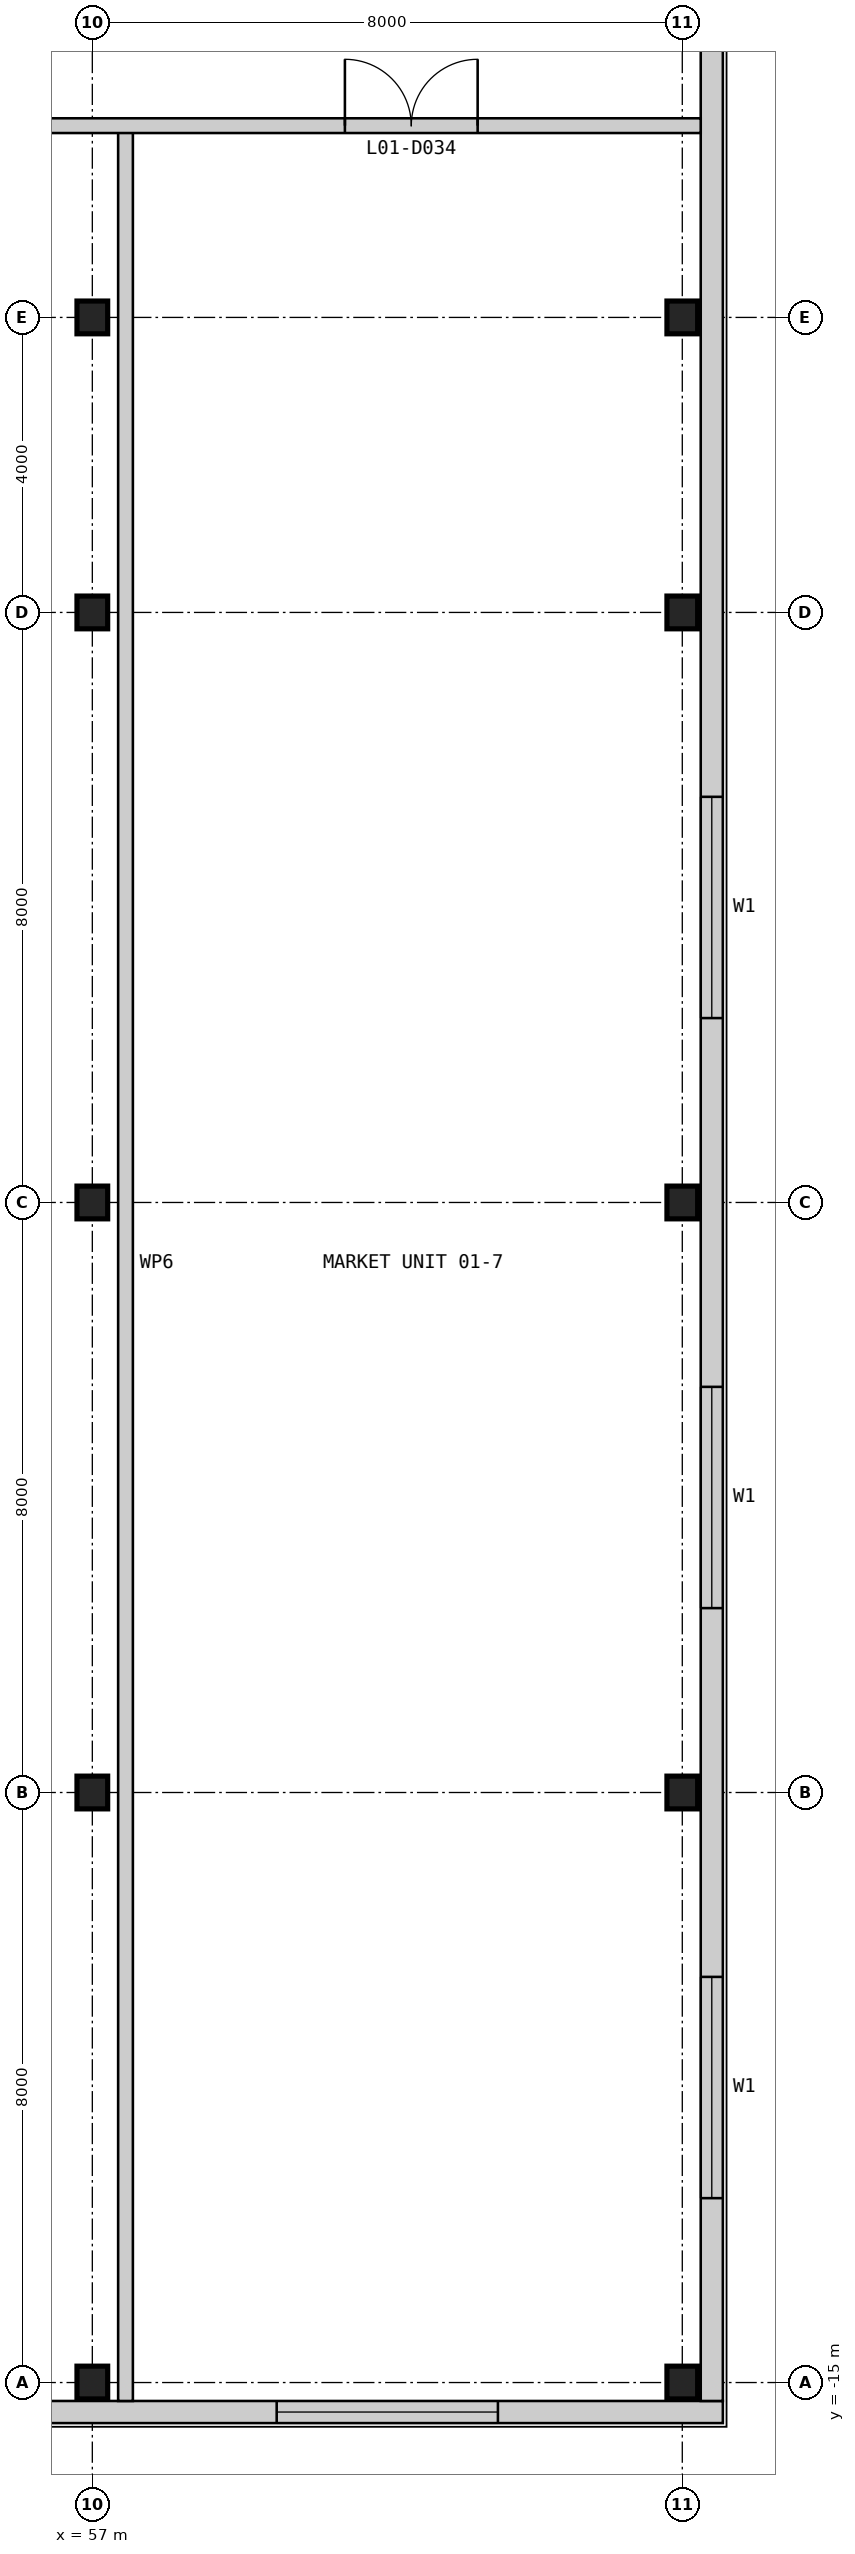
"""IFC4 building model, lengths in metres.
Left out: names, types, materials, properties, quantities, classifications, styles, units other than length and angle.
Written with IfcOpenShell. Run it as: python <this file> out.ifc"""

import sys

from ifc_helpers import new_model, si_unit, direction, frame, frame_2d, origin, origin_2d, place, context, subcontext, project, spatial, rectangle, i_section, extrude, element, fill, save


model = new_model("IFC4")
c1 = context("Model", 3, precision=1e-05, world=origin(), true_north=direction((0.0, 1.0)))
c2 = subcontext(c1, "Body", "Model", "MODEL_VIEW")
j1 = project(units=[si_unit("LENGTHUNIT", "METRE"), si_unit("PLANEANGLEUNIT", "RADIAN")], contexts=[c1])
p1 = place(None, origin())
s1 = spatial("IfcSite", under=j1, at=p1, CompositionType="ELEMENT")
p2 = place(p1, origin())
s2 = spatial("IfcBuilding", under=s1, at=p2, CompositionType="ELEMENT")
p3 = place(p2, frame((0.0, 0.0, 7.0)))
s3 = spatial("IfcBuildingStorey", under=s2, at=p3, CompositionType="ELEMENT", Elevation=7.0)
for number, where, z_axis, x_axis in (
    (1, (57.0, -15.0, 0.0), (0.0, 0.0, 1.0), (1.0, 0.0, 0.0)),
    (2, (57.0, -7.0, 0.0), (0.0, 0.0, 1.0), (1.0, 0.0, 0.0)),
    (3, (57.0, 1.0, 0.0), (0.0, 0.0, 1.0), (1.0, 0.0, 0.0)),
    (4, (57.0, 9.0, 0.0), (0.0, 0.0, 1.0), (1.0, 0.0, 0.0)),
    (5, (57.0, 13.0, 0.0), (0.0, 0.0, 1.0), (1.0, 0.0, 0.0)),
    (6, (65.0, -15.0, 0.0), (0.0, 0.0, 1.0), (1.0, 0.0, 0.0)),
    (7, (65.0, -7.0, 0.0), (0.0, 0.0, 1.0), (1.0, 0.0, 0.0)),
    (8, (65.0, 1.0, 0.0), (0.0, 0.0, 1.0), (1.0, 0.0, 0.0)),
    (9, (65.0, 9.0, 0.0), (0.0, 0.0, 1.0), (1.0, 0.0, 0.0)),
    (10, (65.0, 13.0, 0.0), (0.0, 0.0, 1.0), (1.0, 0.0, 0.0)),
):
    element("IfcColumn", number, at=place(p3, frame(where, z_axis=z_axis, x_axis=x_axis)), inside=s3, PredefinedType="COLUMN", context=c2, shape_type="SweptSolid", body=[
        extrude(i_section(OverallWidth=0.417, OverallDepth=0.445, WebThickness=0.039, FlangeThickness=0.063, at=origin_2d()), origin(), (0.0, 0.0, 1.0), 4.8),
    ])
p4 = place(p3, frame((-15.55, -15.4, 0.0), z_axis=(0.0, 0.0, 1.0), x_axis=(1.0, 0.0, 0.0)))
e11 = element("IfcWall", 11, at=p4, inside=s3, PredefinedType="SOLIDWALL", context=c2, shape_type="SweptSolid", body=[
    extrude(rectangle(XDim=81.1, YDim=0.3, at=frame_2d((40.55, 0.0))), origin(), (0.0, 0.0, 1.0), 4.5),
])
p5 = place(p4, frame((3.05, 0.0, 0.9)))
e12 = element("IfcOpeningElement", 12, at=p5, cuts=e11, PredefinedType="OPENING", context=c2, shape_type="SweptSolid", body=[
    extrude(rectangle(XDim=3.0, YDim=2.4, at=frame_2d((1.5, 1.2))), frame((0.0, 0.16, 0.0), z_axis=(0.0, -1.0, 0.0), x_axis=(1.0, 0.0, 0.0)), (0.0, 0.0, 1.0), 0.32),
])
p6 = place(p4, frame((11.05, 0.0, 0.9)))
e13 = element("IfcOpeningElement", 13, at=p6, cuts=e11, PredefinedType="OPENING", context=c2, shape_type="SweptSolid", body=[
    extrude(rectangle(XDim=3.0, YDim=2.4, at=frame_2d((1.5, 1.2))), frame((0.0, 0.16, 0.0), z_axis=(0.0, -1.0, 0.0), x_axis=(1.0, 0.0, 0.0)), (0.0, 0.0, 1.0), 0.32),
])
p7 = place(p4, frame((19.05, 0.0, 0.9)))
e14 = element("IfcOpeningElement", 14, at=p7, cuts=e11, PredefinedType="OPENING", context=c2, shape_type="SweptSolid", body=[
    extrude(rectangle(XDim=3.0, YDim=2.4, at=frame_2d((1.5, 1.2))), frame((0.0, 0.16, 0.0), z_axis=(0.0, -1.0, 0.0), x_axis=(1.0, 0.0, 0.0)), (0.0, 0.0, 1.0), 0.32),
])
p8 = place(p4, frame((33.05, 0.0, 0.9)))
e15 = element("IfcOpeningElement", 15, at=p8, cuts=e11, PredefinedType="OPENING", context=c2, shape_type="SweptSolid", body=[
    extrude(rectangle(XDim=3.0, YDim=2.4, at=frame_2d((1.5, 1.2))), frame((0.0, 0.16, 0.0), z_axis=(0.0, -1.0, 0.0), x_axis=(1.0, 0.0, 0.0)), (0.0, 0.0, 1.0), 0.32),
])
p9 = place(p4, frame((45.05, 0.0, 0.9)))
e16 = element("IfcOpeningElement", 16, at=p9, cuts=e11, PredefinedType="OPENING", context=c2, shape_type="SweptSolid", body=[
    extrude(rectangle(XDim=3.0, YDim=2.4, at=frame_2d((1.5, 1.2))), frame((0.0, 0.16, 0.0), z_axis=(0.0, -1.0, 0.0), x_axis=(1.0, 0.0, 0.0)), (0.0, 0.0, 1.0), 0.32),
])
p10 = place(p4, frame((53.55, 0.0, 0.9)))
e17 = element("IfcOpeningElement", 17, at=p10, cuts=e11, PredefinedType="OPENING", context=c2, shape_type="SweptSolid", body=[
    extrude(rectangle(XDim=3.0, YDim=2.4, at=frame_2d((1.5, 1.2))), frame((0.0, 0.16, 0.0), z_axis=(0.0, -1.0, 0.0), x_axis=(1.0, 0.0, 0.0)), (0.0, 0.0, 1.0), 0.32),
])
p11 = place(p4, frame((59.55, 0.0, 0.9)))
e18 = element("IfcOpeningElement", 18, at=p11, cuts=e11, PredefinedType="OPENING", context=c2, shape_type="SweptSolid", body=[
    extrude(rectangle(XDim=3.0, YDim=2.4, at=frame_2d((1.5, 1.2))), frame((0.0, 0.16, 0.0), z_axis=(0.0, -1.0, 0.0), x_axis=(1.0, 0.0, 0.0)), (0.0, 0.0, 1.0), 0.32),
])
p12 = place(p4, frame((67.05, 0.0, 0.9)))
e19 = element("IfcOpeningElement", 19, at=p12, cuts=e11, PredefinedType="OPENING", context=c2, shape_type="SweptSolid", body=[
    extrude(rectangle(XDim=3.0, YDim=2.4, at=frame_2d((1.5, 1.2))), frame((0.0, 0.16, 0.0), z_axis=(0.0, -1.0, 0.0), x_axis=(1.0, 0.0, 0.0)), (0.0, 0.0, 1.0), 0.32),
])
p13 = place(p4, frame((75.05, 0.0, 0.9)))
e20 = element("IfcOpeningElement", 20, at=p13, cuts=e11, PredefinedType="OPENING", context=c2, shape_type="SweptSolid", body=[
    extrude(rectangle(XDim=3.0, YDim=2.4, at=frame_2d((1.5, 1.2))), frame((0.0, 0.16, 0.0), z_axis=(0.0, -1.0, 0.0), x_axis=(1.0, 0.0, 0.0)), (0.0, 0.0, 1.0), 0.32),
])
p14 = place(p3, frame((65.4, -15.25, 0.0), z_axis=(0.0, 0.0, 1.0), x_axis=(0.0, 1.0, 0.0)))
e21 = element("IfcWall", 21, at=p14, inside=s3, PredefinedType="SOLIDWALL", context=c2, shape_type="SweptSolid", body=[
    extrude(rectangle(XDim=80.5, YDim=0.3, at=frame_2d((40.25, 0.0))), origin(), (0.0, 0.0, 1.0), 4.5),
])
p15 = place(p14, frame((2.75, 0.0, 0.9)))
e22 = element("IfcOpeningElement", 22, at=p15, cuts=e21, PredefinedType="OPENING", context=c2, shape_type="SweptSolid", body=[
    extrude(rectangle(XDim=3.0, YDim=2.4, at=frame_2d((1.5, 1.2))), frame((0.0, 0.16, 0.0), z_axis=(0.0, -1.0, 0.0), x_axis=(1.0, 0.0, 0.0)), (0.0, 0.0, 1.0), 0.32),
])
p16 = place(p14, frame((10.75, 0.0, 0.9)))
e23 = element("IfcOpeningElement", 23, at=p16, cuts=e21, PredefinedType="OPENING", context=c2, shape_type="SweptSolid", body=[
    extrude(rectangle(XDim=3.0, YDim=2.4, at=frame_2d((1.5, 1.2))), frame((0.0, 0.16, 0.0), z_axis=(0.0, -1.0, 0.0), x_axis=(1.0, 0.0, 0.0)), (0.0, 0.0, 1.0), 0.32),
])
p17 = place(p14, frame((18.75, 0.0, 0.9)))
e24 = element("IfcOpeningElement", 24, at=p17, cuts=e21, PredefinedType="OPENING", context=c2, shape_type="SweptSolid", body=[
    extrude(rectangle(XDim=3.0, YDim=2.4, at=frame_2d((1.5, 1.2))), frame((0.0, 0.16, 0.0), z_axis=(0.0, -1.0, 0.0), x_axis=(1.0, 0.0, 0.0)), (0.0, 0.0, 1.0), 0.32),
])
p18 = place(p14, frame((32.75, 0.0, 0.9)))
e25 = element("IfcOpeningElement", 25, at=p18, cuts=e21, PredefinedType="OPENING", context=c2, shape_type="SweptSolid", body=[
    extrude(rectangle(XDim=3.0, YDim=2.4, at=frame_2d((1.5, 1.2))), frame((0.0, 0.16, 0.0), z_axis=(0.0, -1.0, 0.0), x_axis=(1.0, 0.0, 0.0)), (0.0, 0.0, 1.0), 0.32),
])
p19 = place(p14, frame((44.75, 0.0, 0.9)))
e26 = element("IfcOpeningElement", 26, at=p19, cuts=e21, PredefinedType="OPENING", context=c2, shape_type="SweptSolid", body=[
    extrude(rectangle(XDim=3.0, YDim=2.4, at=frame_2d((1.5, 1.2))), frame((0.0, 0.16, 0.0), z_axis=(0.0, -1.0, 0.0), x_axis=(1.0, 0.0, 0.0)), (0.0, 0.0, 1.0), 0.32),
])
p20 = place(p14, frame((53.25, 0.0, 0.9)))
e27 = element("IfcOpeningElement", 27, at=p20, cuts=e21, PredefinedType="OPENING", context=c2, shape_type="SweptSolid", body=[
    extrude(rectangle(XDim=3.0, YDim=2.4, at=frame_2d((1.5, 1.2))), frame((0.0, 0.16, 0.0), z_axis=(0.0, -1.0, 0.0), x_axis=(1.0, 0.0, 0.0)), (0.0, 0.0, 1.0), 0.32),
])
p21 = place(p14, frame((59.25, 0.0, 0.9)))
e28 = element("IfcOpeningElement", 28, at=p21, cuts=e21, PredefinedType="OPENING", context=c2, shape_type="SweptSolid", body=[
    extrude(rectangle(XDim=3.0, YDim=2.4, at=frame_2d((1.5, 1.2))), frame((0.0, 0.16, 0.0), z_axis=(0.0, -1.0, 0.0), x_axis=(1.0, 0.0, 0.0)), (0.0, 0.0, 1.0), 0.32),
])
p22 = place(p14, frame((66.75, 0.0, 0.9)))
e29 = element("IfcOpeningElement", 29, at=p22, cuts=e21, PredefinedType="OPENING", context=c2, shape_type="SweptSolid", body=[
    extrude(rectangle(XDim=3.0, YDim=2.4, at=frame_2d((1.5, 1.2))), frame((0.0, 0.16, 0.0), z_axis=(0.0, -1.0, 0.0), x_axis=(1.0, 0.0, 0.0)), (0.0, 0.0, 1.0), 0.32),
])
p23 = place(p14, frame((74.75, 0.0, 0.9)))
e30 = element("IfcOpeningElement", 30, at=p23, cuts=e21, PredefinedType="OPENING", context=c2, shape_type="SweptSolid", body=[
    extrude(rectangle(XDim=3.0, YDim=2.4, at=frame_2d((1.5, 1.2))), frame((0.0, 0.16, 0.0), z_axis=(0.0, -1.0, 0.0), x_axis=(1.0, 0.0, 0.0)), (0.0, 0.0, 1.0), 0.32),
])
p24 = place(p3, frame((57.45, -15.25, 0.0), z_axis=(0.0, 0.0, 1.0), x_axis=(0.0, 1.0, 0.0)))
e31 = element("IfcWall", 31, at=p24, inside=s3, PredefinedType="PARTITIONING", context=c2, shape_type="SweptSolid", body=[
    extrude(rectangle(XDim=30.85, YDim=0.2, at=frame_2d((15.425, 0.0))), origin(), (0.0, 0.0, 1.0), 4.5),
])
p25 = place(p3, frame((43.0, 15.6, 0.0), z_axis=(0.0, 0.0, 1.0), x_axis=(1.0, 0.0, 0.0)))
e32 = element("IfcWall", 32, at=p25, inside=s3, PredefinedType="PARTITIONING", context=c2, shape_type="SweptSolid", body=[
    extrude(rectangle(XDim=22.25, YDim=0.2, at=frame_2d((11.125, 0.0))), origin(), (0.0, 0.0, 1.0), 4.5),
])
p26 = place(p25, frame((10.125, 0.0, 0.0)))
e33 = element("IfcOpeningElement", 33, at=p26, cuts=e32, PredefinedType="OPENING", context=c2, shape_type="SweptSolid", body=[
    extrude(rectangle(XDim=1.8, YDim=2.4, at=frame_2d((0.9, 1.2))), frame((0.0, 0.11, 0.0), z_axis=(0.0, -1.0, 0.0), x_axis=(1.0, 0.0, 0.0)), (0.0, 0.0, 1.0), 0.22),
])
p27 = place(p25, frame((17.425, 0.0, 0.0)))
e34 = element("IfcOpeningElement", 34, at=p27, cuts=e32, PredefinedType="OPENING", context=c2, shape_type="SweptSolid", body=[
    extrude(rectangle(XDim=1.8, YDim=2.4, at=frame_2d((0.9, 1.2))), frame((0.0, 0.11, 0.0), z_axis=(0.0, -1.0, 0.0), x_axis=(1.0, 0.0, 0.0)), (0.0, 0.0, 1.0), 0.22),
])
p28 = place(p25, frame((2.925, 0.0, 0.0)))
e35 = element("IfcOpeningElement", 35, at=p28, cuts=e32, PredefinedType="OPENING", context=c2, shape_type="SweptSolid", body=[
    extrude(rectangle(XDim=1.8, YDim=2.4, at=frame_2d((0.9, 1.2))), frame((0.0, 0.11, 0.0), z_axis=(0.0, -1.0, 0.0), x_axis=(1.0, 0.0, 0.0)), (0.0, 0.0, 1.0), 0.22),
])
p29 = place(p13, origin())
e36 = element("IfcWindow", 36, at=p29, inside=s3, PartitioningType="SINGLE_PANEL", PredefinedType="WINDOW", context=c2, shape_type="SweptSolid", body=[
    extrude(rectangle(XDim=3.0, YDim=2.4, at=frame_2d((1.5, 1.2))), frame((0.0, 0.03, 0.0), z_axis=(0.0, -1.0, 0.0), x_axis=(1.0, 0.0, 0.0)), (0.0, 0.0, 1.0), 0.06),
])
fill(e20, e36)
p30 = place(p15, origin())
e37 = element("IfcWindow", 37, at=p30, inside=s3, PartitioningType="SINGLE_PANEL", PredefinedType="WINDOW", context=c2, shape_type="SweptSolid", body=[
    extrude(rectangle(XDim=3.0, YDim=2.4, at=frame_2d((1.5, 1.2))), frame((0.0, 0.03, 0.0), z_axis=(0.0, -1.0, 0.0), x_axis=(1.0, 0.0, 0.0)), (0.0, 0.0, 1.0), 0.06),
])
fill(e22, e37)
p31 = place(p16, origin())
e38 = element("IfcWindow", 38, at=p31, inside=s3, PartitioningType="SINGLE_PANEL", PredefinedType="WINDOW", context=c2, shape_type="SweptSolid", body=[
    extrude(rectangle(XDim=3.0, YDim=2.4, at=frame_2d((1.5, 1.2))), frame((0.0, 0.03, 0.0), z_axis=(0.0, -1.0, 0.0), x_axis=(1.0, 0.0, 0.0)), (0.0, 0.0, 1.0), 0.06),
])
fill(e23, e38)
p32 = place(p17, origin())
e39 = element("IfcWindow", 39, at=p32, inside=s3, PartitioningType="SINGLE_PANEL", PredefinedType="WINDOW", context=c2, shape_type="SweptSolid", body=[
    extrude(rectangle(XDim=3.0, YDim=2.4, at=frame_2d((1.5, 1.2))), frame((0.0, 0.03, 0.0), z_axis=(0.0, -1.0, 0.0), x_axis=(1.0, 0.0, 0.0)), (0.0, 0.0, 1.0), 0.06),
])
fill(e24, e39)
p33 = place(p27, origin())
e40 = element("IfcDoor", 40, at=p33, inside=s3, OperationType="DOUBLE_DOOR_SINGLE_SWING", PredefinedType="DOOR", context=c2, shape_type="SweptSolid", body=[
    extrude(rectangle(XDim=1.8, YDim=2.4, at=frame_2d((0.9, 1.2))), frame((0.0, 0.025, 0.0), z_axis=(0.0, -1.0, 0.0), x_axis=(1.0, 0.0, 0.0)), (0.0, 0.0, 1.0), 0.05),
])
fill(e34, e40)
save(model, sys.argv[1])
